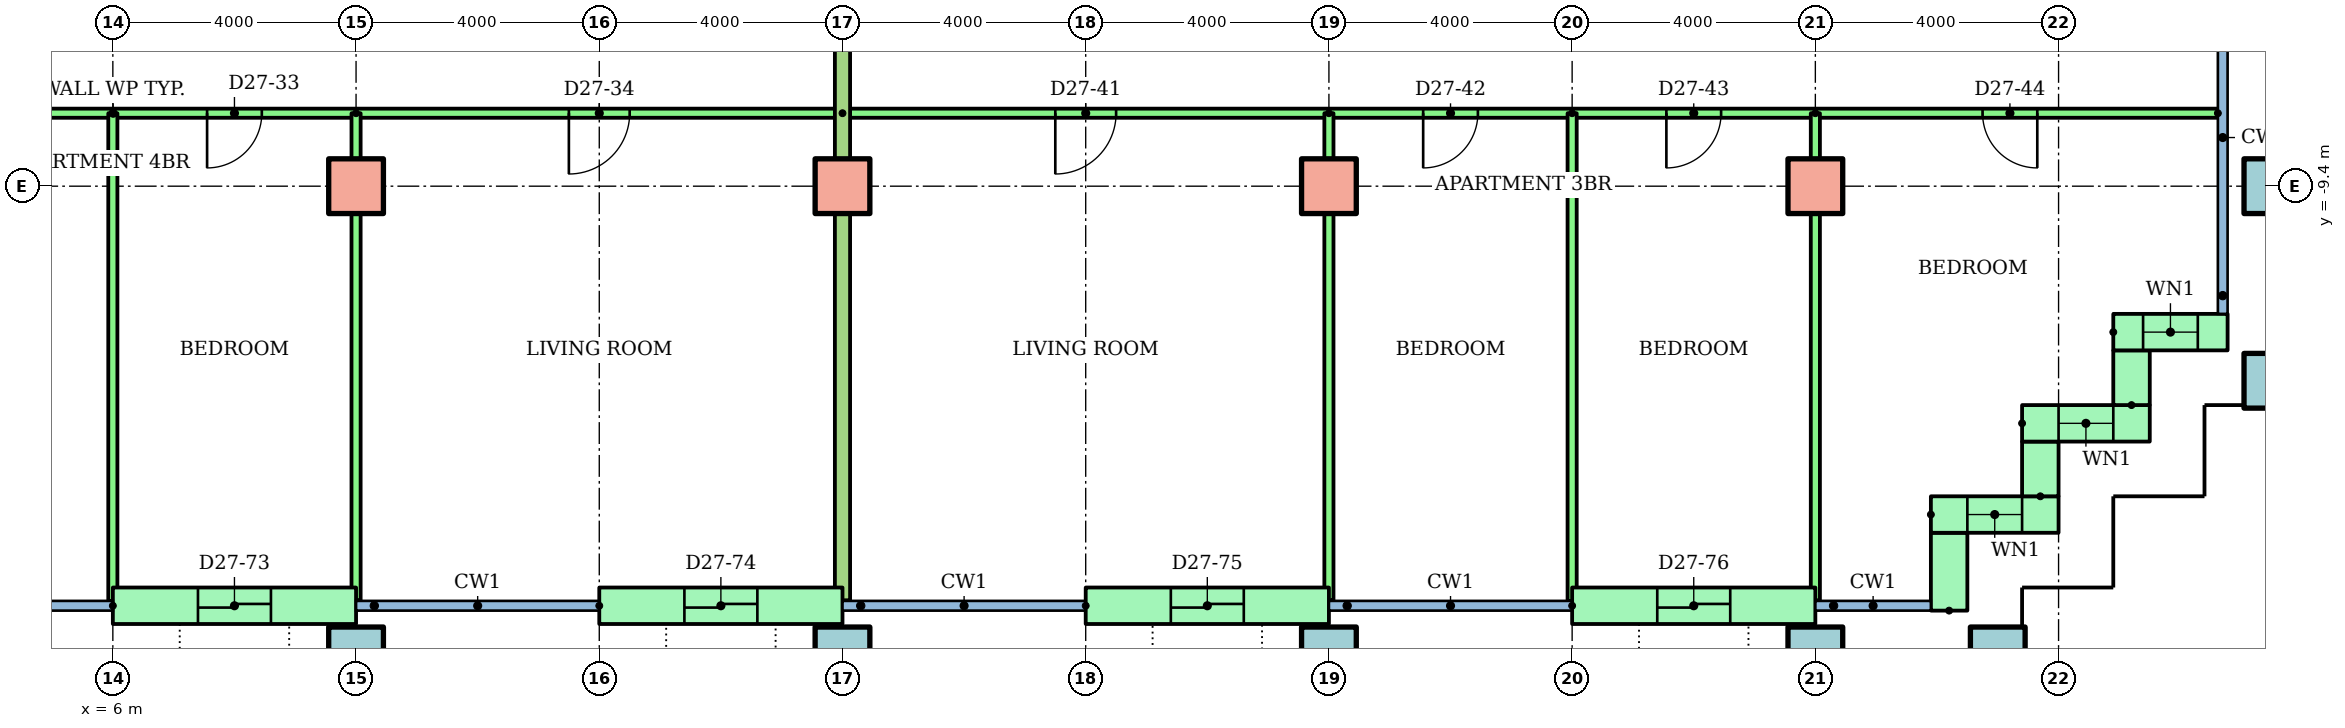
"""IFC4 building model, lengths in metres.
Left out: names, types, materials, properties, quantities, classifications, styles, units other than length and angle.
Written with IfcOpenShell. Run it as: python <this file> out.ifc"""

import sys

from ifc_helpers import new_model, si_unit, direction, frame, frame_2d, origin, origin_2d, place, context, subcontext, project, spatial, rectangle, hollow_rectangle, extrude, element, fill, save


model = new_model("IFC4")
c1 = context("Model", 3, precision=1e-05, world=origin(), true_north=direction((0.0, 1.0)))
c2 = subcontext(c1, "Body", "Model", "MODEL_VIEW")
j1 = project(units=[si_unit("LENGTHUNIT", "METRE"), si_unit("PLANEANGLEUNIT", "RADIAN")], contexts=[c1])
p1 = place(None, origin())
s1 = spatial("IfcSite", under=j1, at=p1, CompositionType="ELEMENT")
p2 = place(p1, origin())
s2 = spatial("IfcBuilding", under=s1, at=p2, CompositionType="ELEMENT")
p3 = place(p2, frame((0.0, 0.0, 103.1)))
s3 = spatial("IfcBuildingStorey", under=s2, at=p3, CompositionType="ELEMENT", Elevation=103.1)
for number, where in (
    (1, (10.0, -17.1, 0.0)),
    (2, (18.0, -17.1, 0.0)),
    (3, (26.0, -17.1, 0.0)),
    (4, (34.0, -17.1, 0.0)),
    (5, (37.0, -17.1, 0.0)),
    (6, (41.5, -12.6, 0.0)),
):
    element("IfcColumn", number, at=place(p3, frame(where)), inside=s3, PredefinedType="COLUMN", context=c2, shape_type="SweptSolid", body=[
        extrude(hollow_rectangle(XDim=0.9, YDim=0.9, WallThickness=0.045, at=origin_2d()), origin(), (0.0, 0.0, 1.0), 3.2),
    ])
for number, where in (
    (7, (10.0, -9.4, 0.0)),
    (8, (18.0, -9.4, 0.0)),
    (9, (26.0, -9.4, 0.0)),
    (10, (34.0, -9.4, 0.0)),
):
    element("IfcColumn", number, at=place(p3, frame(where)), inside=s3, PredefinedType="COLUMN", context=c2, shape_type="SweptSolid", body=[
        extrude(rectangle(XDim=0.9, YDim=0.9, at=origin_2d()), origin(), (0.0, 0.0, 1.0), 3.2),
    ])
p4 = place(p3, frame((41.5, -9.4, 0.0)))
e11 = element("IfcColumn", 11, at=p4, inside=s3, PredefinedType="COLUMN", context=c2, shape_type="SweptSolid", body=[
    extrude(hollow_rectangle(XDim=0.9, YDim=0.9, WallThickness=0.045, at=origin_2d()), origin(), (0.0, 0.0, 1.0), 3.2),
])
p5 = place(p3, frame((6.0, -16.3, 0.0)))
e12 = element("IfcWall", 12, at=p5, inside=s3, PredefinedType="STANDARD", context=c2, shape_type="SweptSolid", body=[
    extrude(rectangle(XDim=4.0, YDim=0.6, at=frame_2d((2.0, 0.0))), origin(), (0.0, 0.0, 1.0), 2.8),
])
p6 = place(p5, frame((1.4, 0.0, 0.0)))
e13 = element("IfcOpeningElement", 13, at=p6, cuts=e12, PredefinedType="OPENING", context=c2, shape_type="SweptSolid", body=[
    extrude(rectangle(XDim=1.2, YDim=2.1, at=frame_2d((0.6, 1.05))), frame((0.0, 0.31, 0.0), z_axis=(0.0, -1.0, 0.0), x_axis=(1.0, 0.0, 0.0)), (0.0, 0.0, 1.0), 0.62),
])
p7 = place(p3, frame((14.0, -16.3, 0.0)))
e14 = element("IfcWall", 14, at=p7, inside=s3, PredefinedType="STANDARD", context=c2, shape_type="SweptSolid", body=[
    extrude(rectangle(XDim=4.0, YDim=0.6, at=frame_2d((2.0, 0.0))), origin(), (0.0, 0.0, 1.0), 2.8),
])
p8 = place(p7, frame((1.4, 0.0, 0.0)))
e15 = element("IfcOpeningElement", 15, at=p8, cuts=e14, PredefinedType="OPENING", context=c2, shape_type="SweptSolid", body=[
    extrude(rectangle(XDim=1.2, YDim=2.1, at=frame_2d((0.6, 1.05))), frame((0.0, 0.31, 0.0), z_axis=(0.0, -1.0, 0.0), x_axis=(1.0, 0.0, 0.0)), (0.0, 0.0, 1.0), 0.62),
])
p9 = place(p3, frame((22.0, -16.3, 0.0)))
e16 = element("IfcWall", 16, at=p9, inside=s3, PredefinedType="STANDARD", context=c2, shape_type="SweptSolid", body=[
    extrude(rectangle(XDim=4.0, YDim=0.6, at=frame_2d((2.0, 0.0))), origin(), (0.0, 0.0, 1.0), 2.8),
])
p10 = place(p9, frame((1.4, 0.0, 0.0)))
e17 = element("IfcOpeningElement", 17, at=p10, cuts=e16, PredefinedType="OPENING", context=c2, shape_type="SweptSolid", body=[
    extrude(rectangle(XDim=1.2, YDim=2.1, at=frame_2d((0.6, 1.05))), frame((0.0, 0.31, 0.0), z_axis=(0.0, -1.0, 0.0), x_axis=(1.0, 0.0, 0.0)), (0.0, 0.0, 1.0), 0.62),
])
p11 = place(p3, frame((30.0, -16.3, 0.0)))
e18 = element("IfcWall", 18, at=p11, inside=s3, PredefinedType="STANDARD", context=c2, shape_type="SweptSolid", body=[
    extrude(rectangle(XDim=4.0, YDim=0.6, at=frame_2d((2.0, 0.0))), origin(), (0.0, 0.0, 1.0), 2.8),
])
p12 = place(p11, frame((1.4, 0.0, 0.0)))
e19 = element("IfcOpeningElement", 19, at=p12, cuts=e18, PredefinedType="OPENING", context=c2, shape_type="SweptSolid", body=[
    extrude(rectangle(XDim=1.2, YDim=2.1, at=frame_2d((0.6, 1.05))), frame((0.0, 0.31, 0.0), z_axis=(0.0, -1.0, 0.0), x_axis=(1.0, 0.0, 0.0)), (0.0, 0.0, 1.0), 0.62),
])
p13 = place(p3, frame((36.2, -16.38, 0.0), z_axis=(0.0, 0.0, 1.0), x_axis=(0.0, 1.0, 0.0)))
e20 = element("IfcWall", 20, at=p13, inside=s3, PredefinedType="STANDARD", context=c2, shape_type="SweptSolid", body=[
    extrude(rectangle(XDim=1.28, YDim=0.6, at=frame_2d((0.64, 0.0))), origin(), (0.0, 0.0, 1.0), 2.8),
])
p14 = place(p3, frame((35.9, -14.8, 0.0)))
e21 = element("IfcWall", 21, at=p14, inside=s3, PredefinedType="STANDARD", context=c2, shape_type="SweptSolid", body=[
    extrude(rectangle(XDim=2.1, YDim=0.6, at=frame_2d((1.05, 0.0))), origin(), (0.0, 0.0, 1.0), 2.8),
])
p15 = place(p14, frame((0.6, 0.0, 0.9)))
e22 = element("IfcOpeningElement", 22, at=p15, cuts=e21, PredefinedType="OPENING", context=c2, shape_type="SweptSolid", body=[
    extrude(rectangle(XDim=0.9, YDim=1.5, at=frame_2d((0.45, 0.75))), frame((0.0, 0.31, 0.0), z_axis=(0.0, -1.0, 0.0), x_axis=(1.0, 0.0, 0.0)), (0.0, 0.0, 1.0), 0.62),
])
p16 = place(p3, frame((37.7, -14.5, 0.0), z_axis=(0.0, 0.0, 1.0), x_axis=(0.0, 1.0, 0.0)))
e23 = element("IfcWall", 23, at=p16, inside=s3, PredefinedType="STANDARD", context=c2, shape_type="SweptSolid", body=[
    extrude(rectangle(XDim=0.9, YDim=0.6, at=frame_2d((0.45, 0.0))), origin(), (0.0, 0.0, 1.0), 2.8),
])
p17 = place(p3, frame((37.4, -13.3, 0.0)))
e24 = element("IfcWall", 24, at=p17, inside=s3, PredefinedType="STANDARD", context=c2, shape_type="SweptSolid", body=[
    extrude(rectangle(XDim=2.1, YDim=0.6, at=frame_2d((1.05, 0.0))), origin(), (0.0, 0.0, 1.0), 2.8),
])
p18 = place(p17, frame((0.6, 0.0, 0.9)))
e25 = element("IfcOpeningElement", 25, at=p18, cuts=e24, PredefinedType="OPENING", context=c2, shape_type="SweptSolid", body=[
    extrude(rectangle(XDim=0.9, YDim=1.5, at=frame_2d((0.45, 0.75))), frame((0.0, 0.31, 0.0), z_axis=(0.0, -1.0, 0.0), x_axis=(1.0, 0.0, 0.0)), (0.0, 0.0, 1.0), 0.62),
])
p19 = place(p3, frame((39.2, -13.0, 0.0), z_axis=(0.0, 0.0, 1.0), x_axis=(0.0, 1.0, 0.0)))
e26 = element("IfcWall", 26, at=p19, inside=s3, PredefinedType="STANDARD", context=c2, shape_type="SweptSolid", body=[
    extrude(rectangle(XDim=0.9, YDim=0.6, at=frame_2d((0.45, 0.0))), origin(), (0.0, 0.0, 1.0), 2.8),
])
p20 = place(p3, frame((38.9, -11.8, 0.0)))
e27 = element("IfcWall", 27, at=p20, inside=s3, PredefinedType="STANDARD", context=c2, shape_type="SweptSolid", body=[
    extrude(rectangle(XDim=1.88, YDim=0.6, at=frame_2d((0.94, 0.0))), origin(), (0.0, 0.0, 1.0), 2.8),
])
p21 = place(p20, frame((0.49, 0.0, 0.9)))
e28 = element("IfcOpeningElement", 28, at=p21, cuts=e27, PredefinedType="OPENING", context=c2, shape_type="SweptSolid", body=[
    extrude(rectangle(XDim=0.9, YDim=1.5, at=frame_2d((0.45, 0.75))), frame((0.0, 0.31, 0.0), z_axis=(0.0, -1.0, 0.0), x_axis=(1.0, 0.0, 0.0)), (0.0, 0.0, 1.0), 0.62),
])
p22 = place(p3, frame((18.0, -8.2, 0.0), z_axis=(0.0, 0.0, 1.0), x_axis=(-1.0, 0.0, 0.0)))
e29 = element("IfcWall", 29, at=p22, inside=s3, PredefinedType="PARTITIONING", context=c2, shape_type="SweptSolid", body=[
    extrude(rectangle(XDim=24.0, YDim=0.15, at=frame_2d((12.0, 0.0))), origin(), (0.0, 0.0, 1.0), 2.4),
])
p23 = place(p22, frame((21.55, 0.0, 0.0)))
e30 = element("IfcOpeningElement", 30, at=p23, cuts=e29, PredefinedType="OPENING", context=c2, shape_type="SweptSolid", body=[
    extrude(rectangle(XDim=0.9, YDim=2.1, at=frame_2d((0.45, 1.05))), frame((0.0, 0.085, 0.0), z_axis=(0.0, -1.0, 0.0), x_axis=(1.0, 0.0, 0.0)), (0.0, 0.0, 1.0), 0.17),
])
p24 = place(p22, frame((17.55, 0.0, 0.0)))
e31 = element("IfcOpeningElement", 31, at=p24, cuts=e29, PredefinedType="OPENING", context=c2, shape_type="SweptSolid", body=[
    extrude(rectangle(XDim=0.9, YDim=2.1, at=frame_2d((0.45, 1.05))), frame((0.0, 0.085, 0.0), z_axis=(0.0, -1.0, 0.0), x_axis=(1.0, 0.0, 0.0)), (0.0, 0.0, 1.0), 0.17),
])
p25 = place(p22, frame((13.55, 0.0, 0.0)))
e32 = element("IfcOpeningElement", 32, at=p25, cuts=e29, PredefinedType="OPENING", context=c2, shape_type="SweptSolid", body=[
    extrude(rectangle(XDim=0.9, YDim=2.1, at=frame_2d((0.45, 1.05))), frame((0.0, 0.085, 0.0), z_axis=(0.0, -1.0, 0.0), x_axis=(1.0, 0.0, 0.0)), (0.0, 0.0, 1.0), 0.17),
])
p26 = place(p22, frame((9.55, 0.0, 0.0)))
e33 = element("IfcOpeningElement", 33, at=p26, cuts=e29, PredefinedType="OPENING", context=c2, shape_type="SweptSolid", body=[
    extrude(rectangle(XDim=0.9, YDim=2.1, at=frame_2d((0.45, 1.05))), frame((0.0, 0.085, 0.0), z_axis=(0.0, -1.0, 0.0), x_axis=(1.0, 0.0, 0.0)), (0.0, 0.0, 1.0), 0.17),
])
p27 = place(p22, frame((3.5, 0.0, 0.0)))
e34 = element("IfcOpeningElement", 34, at=p27, cuts=e29, PredefinedType="OPENING", context=c2, shape_type="SweptSolid", body=[
    extrude(rectangle(XDim=1.0, YDim=2.1, at=frame_2d((0.5, 1.05))), frame((0.0, 0.085, 0.0), z_axis=(0.0, -1.0, 0.0), x_axis=(1.0, 0.0, 0.0)), (0.0, 0.0, 1.0), 0.17),
])
p28 = place(p3, frame((6.0, -8.2, 0.0), z_axis=(0.0, 0.0, 1.0), x_axis=(0.0, -1.0, 0.0)))
e35 = element("IfcWall", 35, at=p28, inside=s3, PredefinedType="PARTITIONING", context=c2, shape_type="SweptSolid", body=[
    extrude(rectangle(XDim=8.021, YDim=0.15, at=frame_2d((4.01, 0.0))), origin(), (0.0, 0.0, 1.0), 2.4),
])
p29 = place(p3, frame((10.0, -8.2, 0.0), z_axis=(0.0, 0.0, 1.0), x_axis=(0.0, -1.0, 0.0)))
e36 = element("IfcWall", 36, at=p29, inside=s3, PredefinedType="PARTITIONING", context=c2, shape_type="SweptSolid", body=[
    extrude(rectangle(XDim=8.01, YDim=0.15, at=frame_2d((4.005, 0.0))), origin(), (0.0, 0.0, 1.0), 2.4),
])
p30 = place(p3, frame((40.62, -8.2, 0.0), z_axis=(0.0, 0.0, 1.0), x_axis=(-1.0, 0.0, 0.0)))
e37 = element("IfcWall", 37, at=p30, inside=s3, PredefinedType="PARTITIONING", context=c2, shape_type="SweptSolid", body=[
    extrude(rectangle(XDim=22.62, YDim=0.15, at=frame_2d((11.31, 0.0))), origin(), (0.0, 0.0, 1.0), 2.4),
])
p31 = place(p30, frame((18.12, 0.0, 0.0)))
e38 = element("IfcOpeningElement", 38, at=p31, cuts=e37, PredefinedType="OPENING", context=c2, shape_type="SweptSolid", body=[
    extrude(rectangle(XDim=1.0, YDim=2.1, at=frame_2d((0.5, 1.05))), frame((0.0, 0.085, 0.0), z_axis=(0.0, -1.0, 0.0), x_axis=(1.0, 0.0, 0.0)), (0.0, 0.0, 1.0), 0.17),
])
p32 = place(p30, frame((12.17, 0.0, 0.0)))
e39 = element("IfcOpeningElement", 39, at=p32, cuts=e37, PredefinedType="OPENING", context=c2, shape_type="SweptSolid", body=[
    extrude(rectangle(XDim=0.9, YDim=2.1, at=frame_2d((0.45, 1.05))), frame((0.0, 0.085, 0.0), z_axis=(0.0, -1.0, 0.0), x_axis=(1.0, 0.0, 0.0)), (0.0, 0.0, 1.0), 0.17),
])
p33 = place(p30, frame((8.17, 0.0, 0.0)))
e40 = element("IfcOpeningElement", 40, at=p33, cuts=e37, PredefinedType="OPENING", context=c2, shape_type="SweptSolid", body=[
    extrude(rectangle(XDim=0.9, YDim=2.1, at=frame_2d((0.45, 1.05))), frame((0.0, 0.085, 0.0), z_axis=(0.0, -1.0, 0.0), x_axis=(1.0, 0.0, 0.0)), (0.0, 0.0, 1.0), 0.17),
])
p34 = place(p30, frame((2.97, 0.0, 0.0)))
e41 = element("IfcOpeningElement", 41, at=p34, cuts=e37, PredefinedType="OPENING", context=c2, shape_type="SweptSolid", body=[
    extrude(rectangle(XDim=0.9, YDim=2.1, at=frame_2d((0.45, 1.05))), frame((0.0, 0.085, 0.0), z_axis=(0.0, -1.0, 0.0), x_axis=(1.0, 0.0, 0.0)), (0.0, 0.0, 1.0), 0.17),
])
p35 = place(p3, frame((26.0, -8.2, 0.0), z_axis=(0.0, 0.0, 1.0), x_axis=(0.0, -1.0, 0.0)))
e42 = element("IfcWall", 42, at=p35, inside=s3, PredefinedType="PARTITIONING", context=c2, shape_type="SweptSolid", body=[
    extrude(rectangle(XDim=8.01, YDim=0.15, at=frame_2d((4.005, 0.0))), origin(), (0.0, 0.0, 1.0), 2.4),
])
p36 = place(p3, frame((30.0, -8.2, 0.0), z_axis=(0.0, 0.0, 1.0), x_axis=(0.0, -1.0, 0.0)))
e43 = element("IfcWall", 43, at=p36, inside=s3, PredefinedType="PARTITIONING", context=c2, shape_type="SweptSolid", body=[
    extrude(rectangle(XDim=8.021, YDim=0.15, at=frame_2d((4.01, 0.0))), origin(), (0.0, 0.0, 1.0), 2.4),
])
p37 = place(p3, frame((34.0, -8.2, 0.0), z_axis=(0.0, 0.0, 1.0), x_axis=(0.0, -1.0, 0.0)))
e44 = element("IfcWall", 44, at=p37, inside=s3, PredefinedType="PARTITIONING", context=c2, shape_type="SweptSolid", body=[
    extrude(rectangle(XDim=8.01, YDim=0.15, at=frame_2d((4.005, 0.0))), origin(), (0.0, 0.0, 1.0), 2.4),
])
p38 = place(p3, frame((18.0, -1.4, 0.0), z_axis=(0.0, 0.0, 1.0), x_axis=(0.0, -1.0, 0.0)))
e45 = element("IfcWall", 45, at=p38, inside=s3, PredefinedType="PARTITIONING", context=c2, shape_type="SweptSolid", body=[
    extrude(rectangle(XDim=14.81, YDim=0.25, at=frame_2d((7.405, 0.0))), origin(), (0.0, 0.0, 1.0), 2.4),
])
p39 = place(p15, origin())
e46 = element("IfcWindow", 46, at=p39, inside=s3, PartitioningType="SINGLE_PANEL", PredefinedType="WINDOW", context=c2, shape_type="SweptSolid", body=[
    extrude(rectangle(XDim=0.9, YDim=1.5, at=frame_2d((0.45, 0.75))), frame((0.0, 0.03, 0.0), z_axis=(0.0, -1.0, 0.0), x_axis=(1.0, 0.0, 0.0)), (0.0, 0.0, 1.0), 0.06),
])
fill(e22, e46)
p40 = place(p18, origin())
e47 = element("IfcWindow", 47, at=p40, inside=s3, PartitioningType="SINGLE_PANEL", PredefinedType="WINDOW", context=c2, shape_type="SweptSolid", body=[
    extrude(rectangle(XDim=0.9, YDim=1.5, at=frame_2d((0.45, 0.75))), frame((0.0, 0.03, 0.0), z_axis=(0.0, -1.0, 0.0), x_axis=(1.0, 0.0, 0.0)), (0.0, 0.0, 1.0), 0.06),
])
fill(e25, e47)
p41 = place(p21, origin())
e48 = element("IfcWindow", 48, at=p41, inside=s3, PartitioningType="SINGLE_PANEL", PredefinedType="WINDOW", context=c2, shape_type="SweptSolid", body=[
    extrude(rectangle(XDim=0.9, YDim=1.5, at=frame_2d((0.45, 0.75))), frame((0.0, 0.03, 0.0), z_axis=(0.0, -1.0, 0.0), x_axis=(1.0, 0.0, 0.0)), (0.0, 0.0, 1.0), 0.06),
])
fill(e28, e48)
p42 = place(p26, origin())
e49 = element("IfcDoor", 49, at=p42, inside=s3, OperationType="SINGLE_SWING_RIGHT", PredefinedType="DOOR", context=c2, shape_type="SweptSolid", body=[
    extrude(rectangle(XDim=0.9, YDim=2.1, at=frame_2d((0.45, 1.05))), frame((0.0, 0.025, 0.0), z_axis=(0.0, -1.0, 0.0), x_axis=(1.0, 0.0, 0.0)), (0.0, 0.0, 1.0), 0.05),
])
fill(e33, e49)
p43 = place(p27, origin())
e50 = element("IfcDoor", 50, at=p43, inside=s3, OperationType="SINGLE_SWING_RIGHT", PredefinedType="DOOR", context=c2, shape_type="SweptSolid", body=[
    extrude(rectangle(XDim=1.0, YDim=2.1, at=frame_2d((0.5, 1.05))), frame((0.0, 0.025, 0.0), z_axis=(0.0, -1.0, 0.0), x_axis=(1.0, 0.0, 0.0)), (0.0, 0.0, 1.0), 0.05),
])
fill(e34, e50)
p44 = place(p31, origin())
e51 = element("IfcDoor", 51, at=p44, inside=s3, OperationType="SINGLE_SWING_RIGHT", PredefinedType="DOOR", context=c2, shape_type="SweptSolid", body=[
    extrude(rectangle(XDim=1.0, YDim=2.1, at=frame_2d((0.5, 1.05))), frame((0.0, 0.025, 0.0), z_axis=(0.0, -1.0, 0.0), x_axis=(1.0, 0.0, 0.0)), (0.0, 0.0, 1.0), 0.05),
])
fill(e38, e51)
p45 = place(p32, origin())
e52 = element("IfcDoor", 52, at=p45, inside=s3, OperationType="SINGLE_SWING_RIGHT", PredefinedType="DOOR", context=c2, shape_type="SweptSolid", body=[
    extrude(rectangle(XDim=0.9, YDim=2.1, at=frame_2d((0.45, 1.05))), frame((0.0, 0.025, 0.0), z_axis=(0.0, -1.0, 0.0), x_axis=(1.0, 0.0, 0.0)), (0.0, 0.0, 1.0), 0.05),
])
fill(e39, e52)
p46 = place(p33, origin())
e53 = element("IfcDoor", 53, at=p46, inside=s3, OperationType="SINGLE_SWING_RIGHT", PredefinedType="DOOR", context=c2, shape_type="SweptSolid", body=[
    extrude(rectangle(XDim=0.9, YDim=2.1, at=frame_2d((0.45, 1.05))), frame((0.0, 0.025, 0.0), z_axis=(0.0, -1.0, 0.0), x_axis=(1.0, 0.0, 0.0)), (0.0, 0.0, 1.0), 0.05),
])
fill(e40, e53)
p47 = place(p34, origin())
e54 = element("IfcDoor", 54, at=p47, inside=s3, OperationType="SINGLE_SWING_LEFT", PredefinedType="DOOR", context=c2, shape_type="SweptSolid", body=[
    extrude(rectangle(XDim=0.9, YDim=2.1, at=frame_2d((0.45, 1.05))), frame((0.0, 0.025, 0.0), z_axis=(0.0, -1.0, 0.0), x_axis=(1.0, 0.0, 0.0)), (0.0, 0.0, 1.0), 0.05),
])
fill(e41, e54)
p48 = place(p6, origin())
e55 = element("IfcDoor", 55, at=p48, inside=s3, OperationType="SLIDING_TO_LEFT", PredefinedType="DOOR", context=c2, shape_type="SweptSolid", body=[
    extrude(rectangle(XDim=1.2, YDim=2.1, at=frame_2d((0.6, 1.05))), frame((0.0, 0.025, 0.0), z_axis=(0.0, -1.0, 0.0), x_axis=(1.0, 0.0, 0.0)), (0.0, 0.0, 1.0), 0.05),
])
fill(e13, e55)
p49 = place(p8, origin())
e56 = element("IfcDoor", 56, at=p49, inside=s3, OperationType="SLIDING_TO_LEFT", PredefinedType="DOOR", context=c2, shape_type="SweptSolid", body=[
    extrude(rectangle(XDim=1.2, YDim=2.1, at=frame_2d((0.6, 1.05))), frame((0.0, 0.025, 0.0), z_axis=(0.0, -1.0, 0.0), x_axis=(1.0, 0.0, 0.0)), (0.0, 0.0, 1.0), 0.05),
])
fill(e15, e56)
p50 = place(p10, origin())
e57 = element("IfcDoor", 57, at=p50, inside=s3, OperationType="SLIDING_TO_LEFT", PredefinedType="DOOR", context=c2, shape_type="SweptSolid", body=[
    extrude(rectangle(XDim=1.2, YDim=2.1, at=frame_2d((0.6, 1.05))), frame((0.0, 0.025, 0.0), z_axis=(0.0, -1.0, 0.0), x_axis=(1.0, 0.0, 0.0)), (0.0, 0.0, 1.0), 0.05),
])
fill(e17, e57)
p51 = place(p12, origin())
e58 = element("IfcDoor", 58, at=p51, inside=s3, OperationType="SLIDING_TO_LEFT", PredefinedType="DOOR", context=c2, shape_type="SweptSolid", body=[
    extrude(rectangle(XDim=1.2, YDim=2.1, at=frame_2d((0.6, 1.05))), frame((0.0, 0.025, 0.0), z_axis=(0.0, -1.0, 0.0), x_axis=(1.0, 0.0, 0.0)), (0.0, 0.0, 1.0), 0.05),
])
fill(e19, e58)
save(model, sys.argv[1])
